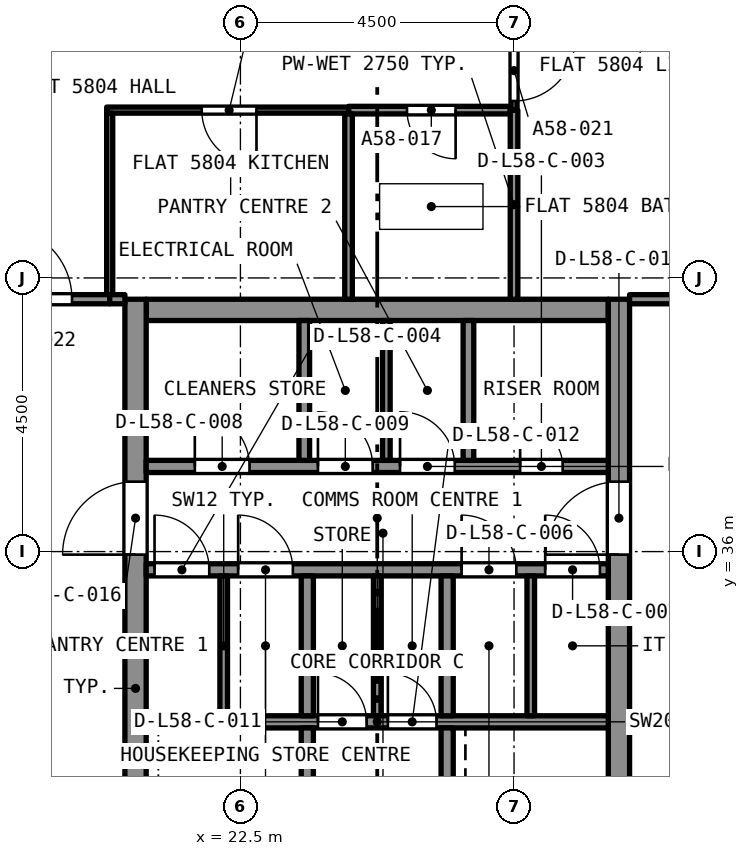
"""IFC4 building model, lengths in metres.
Left out: names, types, materials, properties, quantities, classifications, styles, units other than length and angle.
Written with IfcOpenShell. Run it as: python <this file> out.ifc"""

import sys

from ifc_helpers import new_model, si_unit, direction, frame, frame_2d, origin, place, context, subcontext, project, spatial, rectangle, extrude, element, fill, save


model = new_model("IFC4")
c1 = context("Model", 3, precision=1e-05, world=origin(), true_north=direction((0.0, 1.0)))
c2 = subcontext(c1, "Body", "Model", "MODEL_VIEW")
j1 = project(units=[si_unit("LENGTHUNIT", "METRE"), si_unit("PLANEANGLEUNIT", "RADIAN")], contexts=[c1])
p1 = place(None, origin())
s1 = spatial("IfcSite", under=j1, at=p1, CompositionType="ELEMENT")
p2 = place(p1, origin())
s2 = spatial("IfcBuilding", under=s1, at=p2, CompositionType="ELEMENT")
p3 = place(p2, frame((0.0, 0.0, 210.095)))
s3 = spatial("IfcBuildingStorey", under=s2, at=p3, CompositionType="ELEMENT", Elevation=210.095)
p4 = place(p3, frame((20.95, 39.975, 0.0), z_axis=(0.0, 0.0, 1.0), x_axis=(1.0, 0.0, 0.0)))
e1 = element("IfcWall", 1, at=p4, inside=s3, PredefinedType="SOLIDWALL", context=c2, shape_type="SweptSolid", body=[
    extrude(rectangle(XDim=7.6, YDim=0.35, at=frame_2d((3.8, 0.0))), origin(), (0.0, 0.0, 1.0), 3.2),
])
p5 = place(p3, frame((20.775, 27.35, 0.0), z_axis=(0.0, 0.0, 1.0), x_axis=(0.0, 1.0, 0.0)))
e2 = element("IfcWall", 2, at=p5, inside=s3, PredefinedType="SOLIDWALL", context=c2, shape_type="SweptSolid", body=[
    extrude(rectangle(XDim=12.8, YDim=0.35, at=frame_2d((6.4, 0.0))), origin(), (0.0, 0.0, 1.0), 3.2),
])
p6 = place(p5, frame((8.6, 0.0, 0.0)))
e3 = element("IfcOpeningElement", 3, at=p6, cuts=e2, PredefinedType="OPENING", context=c2, shape_type="SweptSolid", body=[
    extrude(rectangle(XDim=1.2, YDim=2.1, at=frame_2d((0.6, 1.05))), frame((0.0, 0.185, 0.0), z_axis=(0.0, -1.0, 0.0), x_axis=(1.0, 0.0, 0.0)), (0.0, 0.0, 1.0), 0.37),
])
p7 = place(p3, frame((28.725, 27.35, 0.0), z_axis=(0.0, 0.0, 1.0), x_axis=(0.0, 1.0, 0.0)))
e4 = element("IfcWall", 4, at=p7, inside=s3, PredefinedType="SOLIDWALL", context=c2, shape_type="SweptSolid", body=[
    extrude(rectangle(XDim=12.8, YDim=0.35, at=frame_2d((6.4, 0.0))), origin(), (0.0, 0.0, 1.0), 3.2),
])
p8 = place(p7, frame((8.6, 0.0, 0.0)))
e5 = element("IfcOpeningElement", 5, at=p8, cuts=e4, PredefinedType="OPENING", context=c2, shape_type="SweptSolid", body=[
    extrude(rectangle(XDim=1.2, YDim=2.1, at=frame_2d((0.6, 1.05))), frame((0.0, 0.185, 0.0), z_axis=(0.0, -1.0, 0.0), x_axis=(1.0, 0.0, 0.0)), (0.0, 0.0, 1.0), 0.37),
])
p9 = place(p3, frame((26.938, 43.26, 0.0), z_axis=(0.0, 0.0, 1.0), x_axis=(-1.0, 0.0, 0.0)))
e6 = element("IfcWall", 6, at=p9, inside=s3, PredefinedType="PARTITIONING", context=c2, shape_type="SweptSolid", body=[
    extrude(rectangle(XDim=2.659, YDim=0.125, at=frame_2d((1.33, 0.0))), origin(), (0.0, 0.0, 1.0), 2.75),
])
p10 = place(p9, frame((0.898, 0.0, 0.0)))
e7 = element("IfcOpeningElement", 7, at=p10, cuts=e6, PredefinedType="OPENING", context=c2, shape_type="SweptSolid", body=[
    extrude(rectangle(XDim=0.8, YDim=2.1, at=frame_2d((0.4, 1.05))), frame((0.0, 0.073, 0.0), z_axis=(0.0, -1.0, 0.0), x_axis=(1.0, 0.0, 0.0)), (0.0, 0.0, 1.0), 0.145),
])
p11 = place(p3, frame((24.278, 40.15, 0.0), z_axis=(0.0, 0.0, 1.0), x_axis=(0.0, 1.0, 0.0)))
e8 = element("IfcWall", 8, at=p11, inside=s3, PredefinedType="PARTITIONING", context=c2, shape_type="SweptSolid", body=[
    extrude(rectangle(XDim=3.048, YDim=0.125, at=frame_2d((1.524, 0.0))), origin(), (0.0, 0.0, 1.0), 2.75),
])
p12 = place(p3, frame((27.0, 40.15, 0.0), z_axis=(0.0, 0.0, 1.0), x_axis=(0.0, 1.0, 0.0)))
e9 = element("IfcWall", 9, at=p12, inside=s3, PredefinedType="PARTITIONING", context=c2, shape_type="SweptSolid", body=[
    extrude(rectangle(XDim=3.11, YDim=0.125, at=frame_2d((1.555, 0.0))), origin(), (0.0, 0.0, 1.0), 2.75),
])
p13 = place(p3, frame((24.278, 43.26, 0.0), z_axis=(0.0, 0.0, 1.0), x_axis=(-1.0, 0.0, 0.0)))
e10 = element("IfcWall", 10, at=p13, inside=s3, PredefinedType="PARTITIONING", context=c2, shape_type="SweptSolid", body=[
    extrude(rectangle(XDim=3.978, YDim=0.1, at=frame_2d((1.989, 0.0))), origin(), (0.0, 0.0, 1.0), 2.75),
])
p14 = place(p13, frame((1.514, 0.0, 0.0)))
e11 = element("IfcOpeningElement", 11, at=p14, cuts=e10, PredefinedType="OPENING", context=c2, shape_type="SweptSolid", body=[
    extrude(rectangle(XDim=0.9, YDim=2.1, at=frame_2d((0.45, 1.05))), frame((0.0, 0.06, 0.0), z_axis=(0.0, -1.0, 0.0), x_axis=(1.0, 0.0, 0.0)), (0.0, 0.0, 1.0), 0.12),
])
p15 = place(p3, frame((20.35, 40.225, 0.0), z_axis=(0.0, 0.0, 1.0), x_axis=(0.0, 1.0, 0.0)))
e12 = element("IfcWall", 12, at=p15, inside=s3, PredefinedType="PARTITIONING", context=c2, shape_type="SweptSolid", body=[
    extrude(rectangle(XDim=2.985, YDim=0.1, at=frame_2d((1.492, 0.0))), origin(), (0.0, 0.0, 1.0), 2.75),
])
p16 = place(p3, frame((27.0, 44.56, 0.0), z_axis=(0.0, 0.0, 1.0), x_axis=(0.0, -1.0, 0.0)))
e13 = element("IfcWall", 13, at=p16, inside=s3, PredefinedType="PARTITIONING", context=c2, shape_type="SweptSolid", body=[
    extrude(rectangle(XDim=1.3, YDim=0.1, at=frame_2d((0.65, 0.0))), origin(), (0.0, 0.0, 1.0), 2.75),
])
p17 = place(p16, frame((0.15, 0.0, 0.0)))
e14 = element("IfcOpeningElement", 14, at=p17, cuts=e13, PredefinedType="OPENING", context=c2, shape_type="SweptSolid", body=[
    extrude(rectangle(XDim=1.0, YDim=2.1, at=frame_2d((0.5, 1.05))), frame((0.0, 0.06, 0.0), z_axis=(0.0, -1.0, 0.0), x_axis=(1.0, 0.0, 0.0)), (0.0, 0.0, 1.0), 0.12),
])
p18 = place(p3, frame((18.4, 40.15, 0.0), z_axis=(0.0, 0.0, 1.0), x_axis=(1.0, 0.0, 0.0)))
e15 = element("IfcWall", 15, at=p18, inside=s3, PredefinedType="PARTITIONING", context=c2, shape_type="SweptSolid", body=[
    extrude(rectangle(XDim=1.95, YDim=0.15, at=frame_2d((0.975, 0.0))), origin(), (0.0, 0.0, 1.0), 2.75),
])
p19 = place(p18, frame((0.13, 0.0, 0.0)))
e16 = element("IfcOpeningElement", 16, at=p19, cuts=e15, PredefinedType="OPENING", context=c2, shape_type="SweptSolid", body=[
    extrude(rectangle(XDim=1.2, YDim=2.4, at=frame_2d((0.6, 1.2))), frame((0.0, 0.085, 0.0), z_axis=(0.0, -1.0, 0.0), x_axis=(1.0, 0.0, 0.0)), (0.0, 0.0, 1.0), 0.17),
])
p20 = place(p3, frame((20.35, 40.15, 0.0), z_axis=(0.0, 0.0, 1.0), x_axis=(1.0, 0.0, 0.0)))
e17 = element("IfcWall", 17, at=p20, inside=s3, PredefinedType="PARTITIONING", context=c2, shape_type="SweptSolid", body=[
    extrude(rectangle(XDim=0.25, YDim=0.15, at=frame_2d((0.125, 0.0))), origin(), (0.0, 0.0, 1.0), 2.75),
])
p21 = place(p3, frame((28.9, 40.15, 0.0), z_axis=(0.0, 0.0, 1.0), x_axis=(1.0, 0.0, 0.0)))
e18 = element("IfcWall", 18, at=p21, inside=s3, PredefinedType="PARTITIONING", context=c2, shape_type="SweptSolid", body=[
    extrude(rectangle(XDim=2.2, YDim=0.15, at=frame_2d((1.1, 0.0))), origin(), (0.0, 0.0, 1.0), 2.75),
])
p22 = place(p3, frame((20.95, 33.2, 0.0), z_axis=(0.0, 0.0, 1.0), x_axis=(1.0, 0.0, 0.0)))
e19 = element("IfcWall", 19, at=p22, inside=s3, PredefinedType="SOLIDWALL", context=c2, shape_type="SweptSolid", body=[
    extrude(rectangle(XDim=7.6, YDim=0.2, at=frame_2d((3.8, 0.0))), origin(), (0.0, 0.0, 1.0), 2.9),
])
p23 = place(p22, frame((2.825, 0.0, 0.0)))
e20 = element("IfcOpeningElement", 20, at=p23, cuts=e19, PredefinedType="OPENING", context=c2, shape_type="SweptSolid", body=[
    extrude(rectangle(XDim=0.8, YDim=2.1, at=frame_2d((0.4, 1.05))), frame((0.0, 0.11, 0.0), z_axis=(0.0, -1.0, 0.0), x_axis=(1.0, 0.0, 0.0)), (0.0, 0.0, 1.0), 0.22),
])
p24 = place(p22, frame((3.975, 0.0, 0.0)))
e21 = element("IfcOpeningElement", 21, at=p24, cuts=e19, PredefinedType="OPENING", context=c2, shape_type="SweptSolid", body=[
    extrude(rectangle(XDim=0.8, YDim=2.1, at=frame_2d((0.4, 1.05))), frame((0.0, 0.11, 0.0), z_axis=(0.0, -1.0, 0.0), x_axis=(1.0, 0.0, 0.0)), (0.0, 0.0, 1.0), 0.22),
])
p25 = place(p3, frame((20.95, 35.7, 0.0), z_axis=(0.0, 0.0, 1.0), x_axis=(1.0, 0.0, 0.0)))
e22 = element("IfcWall", 22, at=p25, inside=s3, PredefinedType="SOLIDWALL", context=c2, shape_type="SweptSolid", body=[
    extrude(rectangle(XDim=7.6, YDim=0.2, at=frame_2d((3.8, 0.0))), origin(), (0.0, 0.0, 1.0), 2.9),
])
p26 = place(p25, frame((0.137, 0.0, 0.0)))
e23 = element("IfcOpeningElement", 23, at=p26, cuts=e22, PredefinedType="OPENING", context=c2, shape_type="SweptSolid", body=[
    extrude(rectangle(XDim=0.9, YDim=2.1, at=frame_2d((0.45, 1.05))), frame((0.0, 0.11, 0.0), z_axis=(0.0, -1.0, 0.0), x_axis=(1.0, 0.0, 0.0)), (0.0, 0.0, 1.0), 0.22),
])
p27 = place(p25, frame((1.512, 0.0, 0.0)))
e24 = element("IfcOpeningElement", 24, at=p27, cuts=e22, PredefinedType="OPENING", context=c2, shape_type="SweptSolid", body=[
    extrude(rectangle(XDim=0.9, YDim=2.1, at=frame_2d((0.45, 1.05))), frame((0.0, 0.11, 0.0), z_axis=(0.0, -1.0, 0.0), x_axis=(1.0, 0.0, 0.0)), (0.0, 0.0, 1.0), 0.22),
])
p28 = place(p25, frame((5.188, 0.0, 0.0)))
e25 = element("IfcOpeningElement", 25, at=p28, cuts=e22, PredefinedType="OPENING", context=c2, shape_type="SweptSolid", body=[
    extrude(rectangle(XDim=0.9, YDim=2.1, at=frame_2d((0.45, 1.05))), frame((0.0, 0.11, 0.0), z_axis=(0.0, -1.0, 0.0), x_axis=(1.0, 0.0, 0.0)), (0.0, 0.0, 1.0), 0.22),
])
p29 = place(p25, frame((6.562, 0.0, 0.0)))
e26 = element("IfcOpeningElement", 26, at=p29, cuts=e22, PredefinedType="OPENING", context=c2, shape_type="SweptSolid", body=[
    extrude(rectangle(XDim=0.9, YDim=2.1, at=frame_2d((0.45, 1.05))), frame((0.0, 0.11, 0.0), z_axis=(0.0, -1.0, 0.0), x_axis=(1.0, 0.0, 0.0)), (0.0, 0.0, 1.0), 0.22),
])
p30 = place(p3, frame((20.95, 37.4, 0.0), z_axis=(0.0, 0.0, 1.0), x_axis=(1.0, 0.0, 0.0)))
e27 = element("IfcWall", 27, at=p30, inside=s3, PredefinedType="SOLIDWALL", context=c2, shape_type="SweptSolid", body=[
    extrude(rectangle(XDim=7.6, YDim=0.2, at=frame_2d((3.8, 0.0))), origin(), (0.0, 0.0, 1.0), 2.9),
])
p31 = place(p30, frame((6.15, 0.0, 0.0)))
e28 = element("IfcOpeningElement", 28, at=p31, cuts=e27, PredefinedType="OPENING", context=c2, shape_type="SweptSolid", body=[
    extrude(rectangle(XDim=0.7, YDim=2.1, at=frame_2d((0.35, 1.05))), frame((0.0, 0.11, 0.0), z_axis=(0.0, -1.0, 0.0), x_axis=(1.0, 0.0, 0.0)), (0.0, 0.0, 1.0), 0.22),
])
p32 = place(p30, frame((0.8, 0.0, 0.0)))
e29 = element("IfcOpeningElement", 29, at=p32, cuts=e27, PredefinedType="OPENING", context=c2, shape_type="SweptSolid", body=[
    extrude(rectangle(XDim=0.9, YDim=2.1, at=frame_2d((0.45, 1.05))), frame((0.0, 0.11, 0.0), z_axis=(0.0, -1.0, 0.0), x_axis=(1.0, 0.0, 0.0)), (0.0, 0.0, 1.0), 0.22),
])
p33 = place(p30, frame((2.825, 0.0, 0.0)))
e30 = element("IfcOpeningElement", 30, at=p33, cuts=e27, PredefinedType="OPENING", context=c2, shape_type="SweptSolid", body=[
    extrude(rectangle(XDim=0.9, YDim=2.1, at=frame_2d((0.45, 1.05))), frame((0.0, 0.11, 0.0), z_axis=(0.0, -1.0, 0.0), x_axis=(1.0, 0.0, 0.0)), (0.0, 0.0, 1.0), 0.22),
])
p34 = place(p30, frame((4.175, 0.0, 0.0)))
e31 = element("IfcOpeningElement", 31, at=p34, cuts=e27, PredefinedType="OPENING", context=c2, shape_type="SweptSolid", body=[
    extrude(rectangle(XDim=0.9, YDim=2.1, at=frame_2d((0.45, 1.05))), frame((0.0, 0.11, 0.0), z_axis=(0.0, -1.0, 0.0), x_axis=(1.0, 0.0, 0.0)), (0.0, 0.0, 1.0), 0.22),
])
p35 = place(p3, frame((23.6, 27.7, 0.0), z_axis=(0.0, 0.0, 1.0), x_axis=(0.0, 1.0, 0.0)))
e32 = element("IfcWall", 32, at=p35, inside=s3, PredefinedType="SOLIDWALL", context=c2, shape_type="SweptSolid", body=[
    extrude(rectangle(XDim=5.4, YDim=0.2, at=frame_2d((2.7, 0.0))), origin(), (0.0, 0.0, 1.0), 2.9),
])
p36 = place(p35, frame((0.2, 0.0, 0.0)))
e33 = element("IfcOpeningElement", 33, at=p36, cuts=e32, PredefinedType="OPENING", context=c2, shape_type="SweptSolid", body=[
    extrude(rectangle(XDim=0.9, YDim=2.1, at=frame_2d((0.45, 1.05))), frame((0.0, 0.11, 0.0), z_axis=(0.0, -1.0, 0.0), x_axis=(1.0, 0.0, 0.0)), (0.0, 0.0, 1.0), 0.22),
])
p37 = place(p3, frame((25.9, 27.7, 0.0), z_axis=(0.0, 0.0, 1.0), x_axis=(0.0, 1.0, 0.0)))
e34 = element("IfcWall", 34, at=p37, inside=s3, PredefinedType="SOLIDWALL", context=c2, shape_type="SweptSolid", body=[
    extrude(rectangle(XDim=5.4, YDim=0.2, at=frame_2d((2.7, 0.0))), origin(), (0.0, 0.0, 1.0), 2.9),
])
p38 = place(p37, frame((0.2, 0.0, 0.0)))
e35 = element("IfcOpeningElement", 35, at=p38, cuts=e34, PredefinedType="OPENING", context=c2, shape_type="SweptSolid", body=[
    extrude(rectangle(XDim=0.9, YDim=2.1, at=frame_2d((0.45, 1.05))), frame((0.0, 0.11, 0.0), z_axis=(0.0, -1.0, 0.0), x_axis=(1.0, 0.0, 0.0)), (0.0, 0.0, 1.0), 0.22),
])
for number, where, z_axis, x_axis in (
    (36, (23.6, 33.3, 0.0), (0.0, 0.0, 1.0), (0.0, 1.0, 0.0)),
    (37, (25.9, 33.3, 0.0), (0.0, 0.0, 1.0), (0.0, 1.0, 0.0)),
):
    element("IfcWall", number, at=place(p3, frame(where, z_axis=z_axis, x_axis=x_axis)), inside=s3, PredefinedType="SOLIDWALL", context=c2, shape_type="SweptSolid", body=[
        extrude(rectangle(XDim=2.3, YDim=0.2, at=frame_2d((1.15, 0.0))), origin(), (0.0, 0.0, 1.0), 2.9),
    ])
for number, where, z_axis, x_axis in (
    (38, (23.55, 37.5, 0.0), (0.0, 0.0, 1.0), (0.0, 1.0, 0.0)),
    (39, (26.25, 37.5, 0.0), (0.0, 0.0, 1.0), (0.0, 1.0, 0.0)),
):
    element("IfcWall", number, at=place(p3, frame(where, z_axis=z_axis, x_axis=x_axis)), inside=s3, PredefinedType="SOLIDWALL", context=c2, shape_type="SweptSolid", body=[
        extrude(rectangle(XDim=2.3, YDim=0.175, at=frame_2d((1.15, 0.0))), origin(), (0.0, 0.0, 1.0), 2.9),
    ])
for number, where, z_axis, x_axis in (
    (40, (22.225, 33.3, 0.0), (0.0, 0.0, 1.0), (0.0, 1.0, 0.0)),
    (41, (27.275, 33.3, 0.0), (0.0, 0.0, 1.0), (0.0, 1.0, 0.0)),
    (42, (24.9, 37.5, 0.0), (0.0, 0.0, 1.0), (0.0, 1.0, 0.0)),
    (43, (24.75, 33.3, 0.0), (0.0, 0.0, 1.0), (0.0, 1.0, 0.0)),
):
    element("IfcWall", number, at=place(p3, frame(where, z_axis=z_axis, x_axis=x_axis)), inside=s3, PredefinedType="PARTITIONING", context=c2, shape_type="SweptSolid", body=[
        extrude(rectangle(XDim=2.3, YDim=0.125, at=frame_2d((1.15, 0.0))), origin(), (0.0, 0.0, 1.0), 2.9),
    ])
p39 = place(p10, origin())
e44 = element("IfcDoor", 44, at=p39, inside=s3, OperationType="SINGLE_SWING_LEFT", PredefinedType="DOOR", context=c2, shape_type="SweptSolid", body=[
    extrude(rectangle(XDim=0.8, YDim=2.1, at=frame_2d((0.4, 1.05))), frame((0.0, 0.025, 0.0), z_axis=(0.0, -1.0, 0.0), x_axis=(1.0, 0.0, 0.0)), (0.0, 0.0, 1.0), 0.05),
])
fill(e7, e44)
p40 = place(p14, origin())
e45 = element("IfcDoor", 45, at=p40, inside=s3, OperationType="SINGLE_SWING_LEFT", PredefinedType="DOOR", context=c2, shape_type="SweptSolid", body=[
    extrude(rectangle(XDim=0.9, YDim=2.1, at=frame_2d((0.45, 1.05))), frame((0.0, 0.025, 0.0), z_axis=(0.0, -1.0, 0.0), x_axis=(1.0, 0.0, 0.0)), (0.0, 0.0, 1.0), 0.05),
])
fill(e11, e45)
p41 = place(p17, origin())
e46 = element("IfcDoor", 46, at=p41, inside=s3, OperationType="SINGLE_SWING_LEFT", PredefinedType="DOOR", context=c2, shape_type="SweptSolid", body=[
    extrude(rectangle(XDim=1.0, YDim=2.1, at=frame_2d((0.5, 1.05))), frame((0.0, 0.025, 0.0), z_axis=(0.0, -1.0, 0.0), x_axis=(1.0, 0.0, 0.0)), (0.0, 0.0, 1.0), 0.05),
])
fill(e14, e46)
p42 = place(p19, origin())
e47 = element("IfcDoor", 47, at=p42, inside=s3, OperationType="SINGLE_SWING_LEFT", PredefinedType="DOOR", context=c2, shape_type="SweptSolid", body=[
    extrude(rectangle(XDim=1.2, YDim=2.4, at=frame_2d((0.6, 1.2))), frame((0.0, 0.025, 0.0), z_axis=(0.0, -1.0, 0.0), x_axis=(1.0, 0.0, 0.0)), (0.0, 0.0, 1.0), 0.05),
])
fill(e16, e47)
p43 = place(p31, origin())
e48 = element("IfcDoor", 48, at=p43, inside=s3, OperationType="SINGLE_SWING_LEFT", PredefinedType="DOOR", context=c2, shape_type="SweptSolid", body=[
    extrude(rectangle(XDim=0.7, YDim=2.1, at=frame_2d((0.35, 1.05))), frame((0.0, 0.025, 0.0), z_axis=(0.0, -1.0, 0.0), x_axis=(1.0, 0.0, 0.0)), (0.0, 0.0, 1.0), 0.05),
])
fill(e28, e48)
p44 = place(p26, origin())
e49 = element("IfcDoor", 49, at=p44, inside=s3, OperationType="SINGLE_SWING_LEFT", PredefinedType="DOOR", context=c2, shape_type="SweptSolid", body=[
    extrude(rectangle(XDim=0.9, YDim=2.1, at=frame_2d((0.45, 1.05))), frame((0.0, 0.025, 0.0), z_axis=(0.0, -1.0, 0.0), x_axis=(1.0, 0.0, 0.0)), (0.0, 0.0, 1.0), 0.05),
])
fill(e23, e49)
p45 = place(p27, origin())
e50 = element("IfcDoor", 50, at=p45, inside=s3, OperationType="SINGLE_SWING_LEFT", PredefinedType="DOOR", context=c2, shape_type="SweptSolid", body=[
    extrude(rectangle(XDim=0.9, YDim=2.1, at=frame_2d((0.45, 1.05))), frame((0.0, 0.025, 0.0), z_axis=(0.0, -1.0, 0.0), x_axis=(1.0, 0.0, 0.0)), (0.0, 0.0, 1.0), 0.05),
])
fill(e24, e50)
p46 = place(p28, origin())
e51 = element("IfcDoor", 51, at=p46, inside=s3, OperationType="SINGLE_SWING_LEFT", PredefinedType="DOOR", context=c2, shape_type="SweptSolid", body=[
    extrude(rectangle(XDim=0.9, YDim=2.1, at=frame_2d((0.45, 1.05))), frame((0.0, 0.025, 0.0), z_axis=(0.0, -1.0, 0.0), x_axis=(1.0, 0.0, 0.0)), (0.0, 0.0, 1.0), 0.05),
])
fill(e25, e51)
p47 = place(p29, origin())
e52 = element("IfcDoor", 52, at=p47, inside=s3, OperationType="SINGLE_SWING_LEFT", PredefinedType="DOOR", context=c2, shape_type="SweptSolid", body=[
    extrude(rectangle(XDim=0.9, YDim=2.1, at=frame_2d((0.45, 1.05))), frame((0.0, 0.025, 0.0), z_axis=(0.0, -1.0, 0.0), x_axis=(1.0, 0.0, 0.0)), (0.0, 0.0, 1.0), 0.05),
])
fill(e26, e52)
p48 = place(p32, origin())
e53 = element("IfcDoor", 53, at=p48, inside=s3, OperationType="SINGLE_SWING_LEFT", PredefinedType="DOOR", context=c2, shape_type="SweptSolid", body=[
    extrude(rectangle(XDim=0.9, YDim=2.1, at=frame_2d((0.45, 1.05))), frame((0.0, 0.025, 0.0), z_axis=(0.0, -1.0, 0.0), x_axis=(1.0, 0.0, 0.0)), (0.0, 0.0, 1.0), 0.05),
])
fill(e29, e53)
p49 = place(p33, origin())
e54 = element("IfcDoor", 54, at=p49, inside=s3, OperationType="SINGLE_SWING_LEFT", PredefinedType="DOOR", context=c2, shape_type="SweptSolid", body=[
    extrude(rectangle(XDim=0.9, YDim=2.1, at=frame_2d((0.45, 1.05))), frame((0.0, 0.025, 0.0), z_axis=(0.0, -1.0, 0.0), x_axis=(1.0, 0.0, 0.0)), (0.0, 0.0, 1.0), 0.05),
])
fill(e30, e54)
p50 = place(p34, origin())
e55 = element("IfcDoor", 55, at=p50, inside=s3, OperationType="SINGLE_SWING_LEFT", PredefinedType="DOOR", context=c2, shape_type="SweptSolid", body=[
    extrude(rectangle(XDim=0.9, YDim=2.1, at=frame_2d((0.45, 1.05))), frame((0.0, 0.025, 0.0), z_axis=(0.0, -1.0, 0.0), x_axis=(1.0, 0.0, 0.0)), (0.0, 0.0, 1.0), 0.05),
])
fill(e31, e55)
p51 = place(p23, origin())
e56 = element("IfcDoor", 56, at=p51, inside=s3, OperationType="SINGLE_SWING_LEFT", PredefinedType="DOOR", context=c2, shape_type="SweptSolid", body=[
    extrude(rectangle(XDim=0.8, YDim=2.1, at=frame_2d((0.4, 1.05))), frame((0.0, 0.025, 0.0), z_axis=(0.0, -1.0, 0.0), x_axis=(1.0, 0.0, 0.0)), (0.0, 0.0, 1.0), 0.05),
])
fill(e20, e56)
p52 = place(p24, origin())
e57 = element("IfcDoor", 57, at=p52, inside=s3, OperationType="SINGLE_SWING_LEFT", PredefinedType="DOOR", context=c2, shape_type="SweptSolid", body=[
    extrude(rectangle(XDim=0.8, YDim=2.1, at=frame_2d((0.4, 1.05))), frame((0.0, 0.025, 0.0), z_axis=(0.0, -1.0, 0.0), x_axis=(1.0, 0.0, 0.0)), (0.0, 0.0, 1.0), 0.05),
])
fill(e21, e57)
p53 = place(p6, origin())
e58 = element("IfcDoor", 58, at=p53, inside=s3, OperationType="SINGLE_SWING_LEFT", PredefinedType="DOOR", context=c2, shape_type="SweptSolid", body=[
    extrude(rectangle(XDim=1.2, YDim=2.1, at=frame_2d((0.6, 1.05))), frame((0.0, 0.025, 0.0), z_axis=(0.0, -1.0, 0.0), x_axis=(1.0, 0.0, 0.0)), (0.0, 0.0, 1.0), 0.05),
])
fill(e3, e58)
p54 = place(p8, origin())
e59 = element("IfcDoor", 59, at=p54, inside=s3, OperationType="SINGLE_SWING_LEFT", PredefinedType="DOOR", context=c2, shape_type="SweptSolid", body=[
    extrude(rectangle(XDim=1.2, YDim=2.1, at=frame_2d((0.6, 1.05))), frame((0.0, 0.025, 0.0), z_axis=(0.0, -1.0, 0.0), x_axis=(1.0, 0.0, 0.0)), (0.0, 0.0, 1.0), 0.05),
])
fill(e5, e59)
save(model, sys.argv[1])
